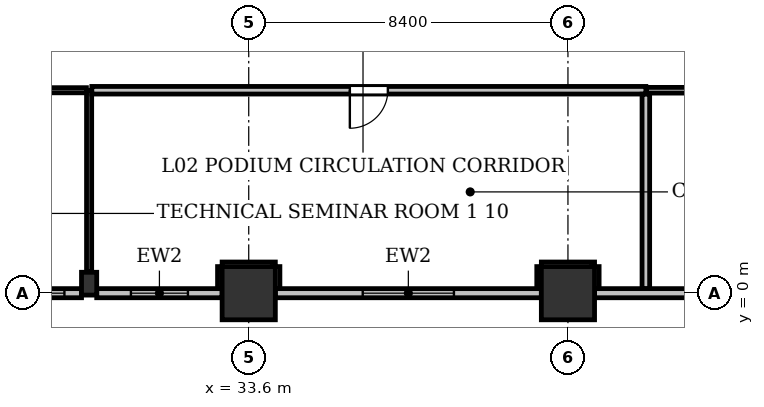
"""IFC4 building model, lengths in metres.
Left out: names, types, materials, properties, quantities, classifications, styles, units other than length and angle.
Written with IfcOpenShell. Run it as: python <this file> out.ifc"""

import sys

from ifc_helpers import new_model, si_unit, direction, frame, frame_2d, origin, origin_2d, place, context, subcontext, project, spatial, rectangle, extrude, element, fill, save


model = new_model("IFC4")
c1 = context("Model", 3, precision=1e-05, world=origin(), true_north=direction((0.0, 1.0)))
c2 = subcontext(c1, "Body", "Model", "MODEL_VIEW")
j1 = project(units=[si_unit("LENGTHUNIT", "METRE"), si_unit("PLANEANGLEUNIT", "RADIAN")], contexts=[c1])
p1 = place(None, origin())
s1 = spatial("IfcSite", under=j1, at=p1, CompositionType="ELEMENT")
p2 = place(p1, origin())
s2 = spatial("IfcBuilding", under=s1, at=p2, CompositionType="ELEMENT")
p3 = place(p2, frame((0.0, 0.0, 10.2)))
s3 = spatial("IfcBuildingStorey", under=s2, at=p3, CompositionType="ELEMENT", Elevation=10.2)
for number, where, z_axis, x_axis in (
    (1, (33.6, 0.0, 0.0), (0.0, 0.0, 1.0), (1.0, 0.0, 0.0)),
    (2, (42.0, 0.0, 0.0), (0.0, 0.0, 1.0), (1.0, 0.0, 0.0)),
):
    element("IfcColumn", number, at=place(p3, frame(where, z_axis=z_axis, x_axis=x_axis)), inside=s3, PredefinedType="COLUMN", context=c2, shape_type="SweptSolid", body=[
        extrude(rectangle(XDim=1.4, YDim=1.4, at=origin_2d()), origin(), (0.0, 0.0, 1.0), 4.8),
    ])
p4 = place(p3, frame((29.4, 0.25, 0.0), z_axis=(0.0, 0.0, 1.0), x_axis=(1.0, 0.0, 0.0)))
e3 = element("IfcColumn", 3, at=p4, inside=s3, PredefinedType="PILASTER", context=c2, shape_type="SweptSolid", body=[
    extrude(rectangle(XDim=0.4, YDim=0.6, at=origin_2d()), origin(), (0.0, 0.0, 1.0), 4.8),
])
p5 = place(p3, frame((49.7, 0.0, 0.0), z_axis=(0.0, 0.0, 1.0), x_axis=(-1.0, 0.0, 0.0)))
e4 = element("IfcWall", 4, at=p5, inside=s3, PredefinedType="STANDARD", context=c2, shape_type="SweptSolid", body=[
    extrude(rectangle(XDim=7.0, YDim=0.24, at=frame_2d((3.5, 0.0))), origin(), (0.0, 0.0, 1.0), 3.725),
])
p6 = place(p5, frame((2.11, 0.0, 0.9)))
e5 = element("IfcOpeningElement", 5, at=p6, cuts=e4, PredefinedType="OPENING", context=c2, shape_type="SweptSolid", body=[
    extrude(rectangle(XDim=1.5, YDim=1.6, at=frame_2d((0.75, 0.8))), frame((0.0, 0.13, 0.0), z_axis=(0.0, -1.0, 0.0), x_axis=(1.0, 0.0, 0.0)), (0.0, 0.0, 1.0), 0.26),
])
p7 = place(p3, frame((41.3, 0.0, 0.0), z_axis=(0.0, 0.0, 1.0), x_axis=(-1.0, 0.0, 0.0)))
e6 = element("IfcWall", 6, at=p7, inside=s3, PredefinedType="STANDARD", context=c2, shape_type="SweptSolid", body=[
    extrude(rectangle(XDim=7.0, YDim=0.24, at=frame_2d((3.5, 0.0))), origin(), (0.0, 0.0, 1.0), 3.725),
])
p8 = place(p7, frame((2.3, 0.0, 0.9)))
e7 = element("IfcOpeningElement", 7, at=p8, cuts=e6, PredefinedType="OPENING", context=c2, shape_type="SweptSolid", body=[
    extrude(rectangle(XDim=2.4, YDim=1.8, at=frame_2d((1.2, 0.9))), frame((0.0, 0.13, 0.0), z_axis=(0.0, -1.0, 0.0), x_axis=(1.0, 0.0, 0.0)), (0.0, 0.0, 1.0), 0.26),
])
p9 = place(p3, frame((32.9, 0.0, 0.0), z_axis=(0.0, 0.0, 1.0), x_axis=(-1.0, 0.0, 0.0)))
e8 = element("IfcWall", 8, at=p9, inside=s3, PredefinedType="STANDARD", context=c2, shape_type="SweptSolid", body=[
    extrude(rectangle(XDim=3.3, YDim=0.24, at=frame_2d((1.65, 0.0))), origin(), (0.0, 0.0, 1.0), 3.725),
])
p10 = place(p9, frame((0.9, 0.0, 0.9)))
e9 = element("IfcOpeningElement", 9, at=p10, cuts=e8, PredefinedType="OPENING", context=c2, shape_type="SweptSolid", body=[
    extrude(rectangle(XDim=1.5, YDim=1.6, at=frame_2d((0.75, 0.8))), frame((0.0, 0.13, 0.0), z_axis=(0.0, -1.0, 0.0), x_axis=(1.0, 0.0, 0.0)), (0.0, 0.0, 1.0), 0.26),
])
p11 = place(p3, frame((29.2, 0.0, 0.0), z_axis=(0.0, 0.0, 1.0), x_axis=(-1.0, 0.0, 0.0)))
e10 = element("IfcWall", 10, at=p11, inside=s3, PredefinedType="STANDARD", context=c2, shape_type="SweptSolid", body=[
    extrude(rectangle(XDim=3.3, YDim=0.24, at=frame_2d((1.65, 0.0))), origin(), (0.0, 0.0, 1.0), 3.725),
])
p12 = place(p11, frame((0.45, 0.0, 0.9)))
e11 = element("IfcOpeningElement", 11, at=p12, cuts=e10, PredefinedType="OPENING", context=c2, shape_type="SweptSolid", body=[
    extrude(rectangle(XDim=2.4, YDim=1.8, at=frame_2d((1.2, 0.9))), frame((0.0, 0.13, 0.0), z_axis=(0.0, -1.0, 0.0), x_axis=(1.0, 0.0, 0.0)), (0.0, 0.0, 1.0), 0.26),
])
p13 = place(p3, frame((29.4, 0.57, 0.0), z_axis=(0.0, 0.0, 1.0), x_axis=(0.0, 1.0, 0.0)))
e12 = element("IfcWall", 12, at=p13, inside=s3, PredefinedType="PARTITIONING", context=c2, shape_type="SweptSolid", body=[
    extrude(rectangle(XDim=4.77, YDim=0.135, at=frame_2d((2.385, 0.0))), origin(), (0.0, 0.0, 1.0), 4.122),
])
p14 = place(p3, frame((29.329, 5.34, 0.0), z_axis=(0.0, 0.0, 1.0), x_axis=(-1.0, 0.0, 0.0)))
e13 = element("IfcWall", 13, at=p14, inside=s3, PredefinedType="PARTITIONING", context=c2, shape_type="SweptSolid", body=[
    extrude(rectangle(XDim=4.859, YDim=0.135, at=frame_2d((2.429, 0.0))), origin(), (0.0, 0.0, 1.0), 3.913),
])
p15 = place(p14, frame((1.954, 0.0, 0.0)))
e14 = element("IfcOpeningElement", 14, at=p15, cuts=e13, PredefinedType="OPENING", context=c2, shape_type="SweptSolid", body=[
    extrude(rectangle(XDim=0.95, YDim=2.15, at=frame_2d((0.475, 1.075))), frame((0.0, 0.077, 0.0), z_axis=(0.0, -1.0, 0.0), x_axis=(1.0, 0.0, 0.0)), (0.0, 0.0, 1.0), 0.155),
])
p16 = place(p3, frame((44.05, 5.34, 0.0), z_axis=(0.0, 0.0, 1.0), x_axis=(-1.0, 0.0, 0.0)))
e15 = element("IfcWall", 15, at=p16, inside=s3, PredefinedType="PARTITIONING", context=c2, shape_type="SweptSolid", body=[
    extrude(rectangle(XDim=14.579, YDim=0.2, at=frame_2d((7.289, 0.0))), origin(), (0.0, 0.0, 1.0), 3.913),
])
p17 = place(p16, frame((6.789, 0.0, 0.0)))
e16 = element("IfcOpeningElement", 16, at=p17, cuts=e15, PredefinedType="OPENING", context=c2, shape_type="SweptSolid", body=[
    extrude(rectangle(XDim=1.0, YDim=2.15, at=frame_2d((0.5, 1.075))), frame((0.0, 0.11, 0.0), z_axis=(0.0, -1.0, 0.0), x_axis=(1.0, 0.0, 0.0)), (0.0, 0.0, 1.0), 0.22),
])
p18 = place(p3, frame((32.88, 0.124, 0.0), z_axis=(0.0, 0.0, 1.0), x_axis=(0.0, 1.0, 0.0)))
e17 = element("IfcWall", 17, at=p18, inside=s3, PredefinedType="PARTITIONING", context=c2, shape_type="SweptSolid", body=[
    extrude(rectangle(XDim=0.576, YDim=0.2, at=frame_2d((0.288, 0.0))), origin(), (0.0, 0.0, 1.0), 3.725),
])
p19 = place(p3, frame((32.9, 0.72, 0.0), z_axis=(0.0, 0.0, 1.0), x_axis=(1.0, 0.0, 0.0)))
e18 = element("IfcWall", 18, at=p19, inside=s3, PredefinedType="PARTITIONING", context=c2, shape_type="SweptSolid", body=[
    extrude(rectangle(XDim=1.4, YDim=0.2, at=frame_2d((0.7, 0.0))), origin(), (0.0, 0.0, 1.0), 3.913),
])
for number, where, z_axis, x_axis in (
    (19, (34.32, 0.7, 0.0), (0.0, 0.0, 1.0), (0.0, -1.0, 0.0)),
    (20, (41.28, 0.124, 0.0), (0.0, 0.0, 1.0), (0.0, 1.0, 0.0)),
):
    element("IfcWall", number, at=place(p3, frame(where, z_axis=z_axis, x_axis=x_axis)), inside=s3, PredefinedType="PARTITIONING", context=c2, shape_type="SweptSolid", body=[
        extrude(rectangle(XDim=0.576, YDim=0.2, at=frame_2d((0.288, 0.0))), origin(), (0.0, 0.0, 1.0), 3.725),
    ])
p20 = place(p3, frame((41.3, 0.72, 0.0), z_axis=(0.0, 0.0, 1.0), x_axis=(1.0, 0.0, 0.0)))
e21 = element("IfcWall", 21, at=p20, inside=s3, PredefinedType="PARTITIONING", context=c2, shape_type="SweptSolid", body=[
    extrude(rectangle(XDim=1.4, YDim=0.2, at=frame_2d((0.7, 0.0))), origin(), (0.0, 0.0, 1.0), 3.913),
])
p21 = place(p3, frame((42.72, 0.7, 0.0), z_axis=(0.0, 0.0, 1.0), x_axis=(0.0, -1.0, 0.0)))
e22 = element("IfcWall", 22, at=p21, inside=s3, PredefinedType="PARTITIONING", context=c2, shape_type="SweptSolid", body=[
    extrude(rectangle(XDim=0.576, YDim=0.2, at=frame_2d((0.288, 0.0))), origin(), (0.0, 0.0, 1.0), 3.725),
])
p22 = place(p3, frame((44.05, 0.124, 0.0), z_axis=(0.0, 0.0, 1.0), x_axis=(0.0, 1.0, 0.0)))
e23 = element("IfcWall", 23, at=p22, inside=s3, PredefinedType="PARTITIONING", context=c2, shape_type="SweptSolid", body=[
    extrude(rectangle(XDim=5.112, YDim=0.2, at=frame_2d((2.556, 0.0))), origin(), (0.0, 0.0, 1.0), 3.725),
])
p23 = place(p3, frame((52.8, 5.34, 0.0), z_axis=(0.0, 0.0, 1.0), x_axis=(-1.0, 0.0, 0.0)))
e24 = element("IfcWall", 24, at=p23, inside=s3, PredefinedType="PARTITIONING", context=c2, shape_type="SweptSolid", body=[
    extrude(rectangle(XDim=8.73, YDim=0.15, at=frame_2d((4.365, 0.0))), origin(), (0.0, 0.0, 1.0), 3.913),
])
p24 = place(p23, frame((3.89, 0.0, 0.0)))
e25 = element("IfcOpeningElement", 25, at=p24, cuts=e24, PredefinedType="OPENING", context=c2, shape_type="SweptSolid", body=[
    extrude(rectangle(XDim=0.95, YDim=2.15, at=frame_2d((0.475, 1.075))), frame((0.0, 0.085, 0.0), z_axis=(0.0, -1.0, 0.0), x_axis=(1.0, 0.0, 0.0)), (0.0, 0.0, 1.0), 0.17),
])
p25 = place(p8, origin())
e26 = element("IfcWindow", 26, at=p25, inside=s3, PartitioningType="SINGLE_PANEL", PredefinedType="WINDOW", context=c2, shape_type="SweptSolid", body=[
    extrude(rectangle(XDim=2.4, YDim=1.8, at=frame_2d((1.2, 0.9))), frame((0.0, 0.03, 0.0), z_axis=(0.0, -1.0, 0.0), x_axis=(1.0, 0.0, 0.0)), (0.0, 0.0, 1.0), 0.06),
])
fill(e7, e26)
p26 = place(p10, origin())
e27 = element("IfcWindow", 27, at=p26, inside=s3, PartitioningType="SINGLE_PANEL", PredefinedType="WINDOW", context=c2, shape_type="SweptSolid", body=[
    extrude(rectangle(XDim=1.5, YDim=1.6, at=frame_2d((0.75, 0.8))), frame((0.0, 0.03, 0.0), z_axis=(0.0, -1.0, 0.0), x_axis=(1.0, 0.0, 0.0)), (0.0, 0.0, 1.0), 0.06),
])
fill(e9, e27)
p27 = place(p12, origin())
e28 = element("IfcWindow", 28, at=p27, inside=s3, PartitioningType="SINGLE_PANEL", PredefinedType="WINDOW", context=c2, shape_type="SweptSolid", body=[
    extrude(rectangle(XDim=2.4, YDim=1.8, at=frame_2d((1.2, 0.9))), frame((0.0, 0.03, 0.0), z_axis=(0.0, -1.0, 0.0), x_axis=(1.0, 0.0, 0.0)), (0.0, 0.0, 1.0), 0.06),
])
fill(e11, e28)
p28 = place(p17, origin())
e29 = element("IfcDoor", 29, at=p28, inside=s3, OperationType="SINGLE_SWING_RIGHT", PredefinedType="DOOR", context=c2, shape_type="SweptSolid", body=[
    extrude(rectangle(XDim=1.0, YDim=2.15, at=frame_2d((0.5, 1.075))), frame((0.0, 0.025, 0.0), z_axis=(0.0, -1.0, 0.0), x_axis=(1.0, 0.0, 0.0)), (0.0, 0.0, 1.0), 0.05),
])
fill(e16, e29)
save(model, sys.argv[1])
